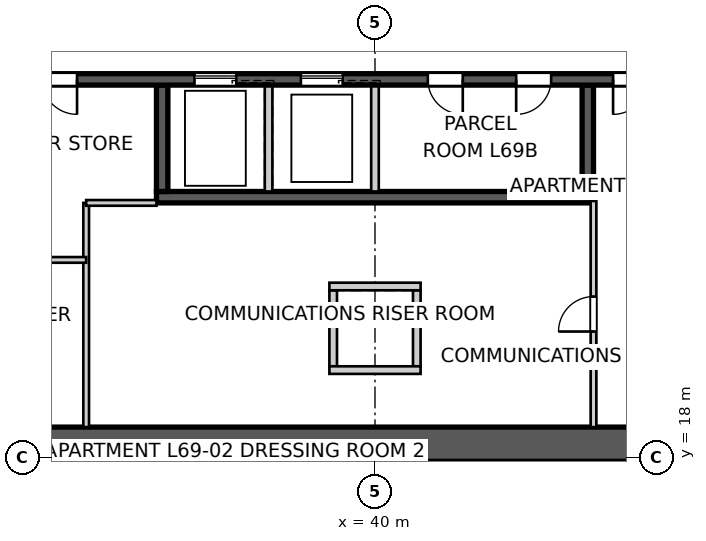
"""IFC4 building model, lengths in metres.
Left out: names, types, materials, properties, quantities, classifications, styles, units other than length and angle.
Written with IfcOpenShell. Run it as: python <this file> out.ifc"""

import sys

from ifc_helpers import new_model, si_unit, direction, frame, frame_2d, origin, place, context, subcontext, project, spatial, polyline, rectangle, outline, extrude, element, fill, save


model = new_model("IFC4")
c1 = context("Model", 3, precision=1e-05, world=origin(), true_north=direction((0.0, 1.0)))
c2 = subcontext(c1, "Body", "Model", "MODEL_VIEW")
j1 = project(units=[si_unit("LENGTHUNIT", "METRE"), si_unit("PLANEANGLEUNIT", "RADIAN")], contexts=[c1])
p1 = place(None, origin())
s1 = spatial("IfcSite", under=j1, at=p1, CompositionType="ELEMENT")
p2 = place(p1, origin())
s2 = spatial("IfcBuilding", under=s1, at=p2, CompositionType="ELEMENT")
p3 = place(p2, frame((0.0, 0.0, 250.6)))
s3 = spatial("IfcBuildingStorey", under=s2, at=p3, CompositionType="ELEMENT", Elevation=250.6)
p4 = place(p3, frame((51.2, 18.35, 0.0), z_axis=(0.0, 0.0, 1.0), x_axis=(-1.0, 0.0, 0.0)))
e1 = element("IfcWall", 1, at=p4, inside=s3, PredefinedType="SHEAR", context=c2, shape_type="SweptSolid", body=[
    extrude(outline(polyline([(0.0, -0.45), (22.4, -0.45), (22.4, -0.025), (22.85, -0.025), (22.85, 0.025), (22.4, 0.025), (22.4, 0.45), (0.0, 0.45), (0.0, 0.025), (-0.45, 0.025), (-0.45, -0.025), (0.0, -0.025), (0.0, -0.45)])), origin(), (0.0, 0.0, 1.0), 3.4),
])
p5 = place(p3, frame((51.2, 27.95, 0.0), z_axis=(0.0, 0.0, 1.0), x_axis=(-1.0, 0.0, 0.0)))
e2 = element("IfcWall", 2, at=p5, inside=s3, PredefinedType="SHEAR", context=c2, shape_type="SweptSolid", body=[
    extrude(rectangle(XDim=22.4, YDim=0.3, at=frame_2d((11.2, 0.0))), origin(), (0.0, 0.0, 1.0), 3.4),
])
p6 = place(p5, frame((19.04, 0.0, 0.0)))
e3 = element("IfcOpeningElement", 3, at=p6, cuts=e2, PredefinedType="OPENING", context=c2, shape_type="SweptSolid", body=[
    extrude(rectangle(XDim=0.92, YDim=2.1, at=frame_2d((0.46, 1.05))), frame((0.0, 0.16, 0.0), z_axis=(0.0, -1.0, 0.0), x_axis=(1.0, 0.0, 0.0)), (0.0, 0.0, 1.0), 0.32),
])
p7 = place(p5, frame((1.265, 0.0, 0.0)))
e4 = element("IfcOpeningElement", 4, at=p7, cuts=e2, PredefinedType="OPENING", context=c2, shape_type="SweptSolid", body=[
    extrude(rectangle(XDim=1.02, YDim=2.1, at=frame_2d((0.51, 1.05))), frame((0.0, 0.16, 0.0), z_axis=(0.0, -1.0, 0.0), x_axis=(1.0, 0.0, 0.0)), (0.0, 0.0, 1.0), 0.32),
])
p8 = place(p5, frame((4.015, 0.0, 0.0)))
e5 = element("IfcOpeningElement", 5, at=p8, cuts=e2, PredefinedType="OPENING", context=c2, shape_type="SweptSolid", body=[
    extrude(rectangle(XDim=0.92, YDim=2.1, at=frame_2d((0.46, 1.05))), frame((0.0, 0.16, 0.0), z_axis=(0.0, -1.0, 0.0), x_axis=(1.0, 0.0, 0.0)), (0.0, 0.0, 1.0), 0.32),
])
p9 = place(p5, frame((8.89, 0.0, 0.0)))
e6 = element("IfcOpeningElement", 6, at=p9, cuts=e2, PredefinedType="OPENING", context=c2, shape_type="SweptSolid", body=[
    extrude(rectangle(XDim=0.92, YDim=2.1, at=frame_2d((0.46, 1.05))), frame((0.0, 0.16, 0.0), z_axis=(0.0, -1.0, 0.0), x_axis=(1.0, 0.0, 0.0)), (0.0, 0.0, 1.0), 0.32),
])
p10 = place(p5, frame((6.565, 0.0, 0.0)))
e7 = element("IfcOpeningElement", 7, at=p10, cuts=e2, PredefinedType="OPENING", context=c2, shape_type="SweptSolid", body=[
    extrude(rectangle(XDim=0.92, YDim=2.1, at=frame_2d((0.46, 1.05))), frame((0.0, 0.16, 0.0), z_axis=(0.0, -1.0, 0.0), x_axis=(1.0, 0.0, 0.0)), (0.0, 0.0, 1.0), 0.32),
])
p11 = place(p5, frame((12.05, 0.0, 0.0)))
e8 = element("IfcOpeningElement", 8, at=p11, cuts=e2, PredefinedType="OPENING", context=c2, shape_type="SweptSolid", body=[
    extrude(rectangle(XDim=1.1, YDim=2.1, at=frame_2d((0.55, 1.05))), frame((0.0, 0.16, 0.0), z_axis=(0.0, -1.0, 0.0), x_axis=(1.0, 0.0, 0.0)), (0.0, 0.0, 1.0), 0.32),
])
p12 = place(p5, frame((14.85, 0.0, 0.0)))
e9 = element("IfcOpeningElement", 9, at=p12, cuts=e2, PredefinedType="OPENING", context=c2, shape_type="SweptSolid", body=[
    extrude(rectangle(XDim=1.1, YDim=2.1, at=frame_2d((0.55, 1.05))), frame((0.0, 0.16, 0.0), z_axis=(0.0, -1.0, 0.0), x_axis=(1.0, 0.0, 0.0)), (0.0, 0.0, 1.0), 0.32),
])
p13 = place(p3, frame((45.75, 24.85, 0.0), z_axis=(0.0, 0.0, 1.0), x_axis=(-1.0, 0.0, 0.0)))
e10 = element("IfcWall", 10, at=p13, inside=s3, PredefinedType="SHEAR", context=c2, shape_type="SweptSolid", body=[
    extrude(rectangle(XDim=11.5, YDim=0.3, at=frame_2d((5.75, 0.0))), origin(), (0.0, 0.0, 1.0), 3.4),
])
p14 = place(p3, frame((45.6, 27.8, 0.0), z_axis=(0.0, 0.0, 1.0), x_axis=(0.0, -1.0, 0.0)))
e11 = element("IfcWall", 11, at=p14, inside=s3, PredefinedType="SHEAR", context=c2, shape_type="SweptSolid", body=[
    extrude(rectangle(XDim=2.8, YDim=0.3, at=frame_2d((1.4, 0.0))), origin(), (0.0, 0.0, 1.0), 3.4),
])
for number, where, z_axis, x_axis in (
    (12, (40.0, 27.8, 0.0), (0.0, 0.0, 1.0), (0.0, -1.0, 0.0)),
    (13, (37.2, 27.8, 0.0), (0.0, 0.0, 1.0), (0.0, -1.0, 0.0)),
):
    element("IfcWall", number, at=place(p3, frame(where, z_axis=z_axis, x_axis=x_axis)), inside=s3, PredefinedType="SOLIDWALL", context=c2, shape_type="SweptSolid", body=[
        extrude(rectangle(XDim=2.8, YDim=0.2, at=frame_2d((1.4, 0.0))), origin(), (0.0, 0.0, 1.0), 3.4),
    ])
p15 = place(p3, frame((34.4, 27.8, 0.0), z_axis=(0.0, 0.0, 1.0), x_axis=(0.0, -1.0, 0.0)))
e14 = element("IfcWall", 14, at=p15, inside=s3, PredefinedType="SHEAR", context=c2, shape_type="SweptSolid", body=[
    extrude(rectangle(XDim=2.8, YDim=0.3, at=frame_2d((1.4, 0.0))), origin(), (0.0, 0.0, 1.0), 3.4),
])
for number, where, z_axis, x_axis in (
    (15, (38.9, 22.4, 0.0), (0.0, 0.0, 1.0), (0.0, -1.0, 0.0)),
    (16, (41.1, 22.4, 0.0), (0.0, 0.0, 1.0), (0.0, -1.0, 0.0)),
):
    element("IfcWall", number, at=place(p3, frame(where, z_axis=z_axis, x_axis=x_axis)), inside=s3, PredefinedType="SOLIDWALL", context=c2, shape_type="SweptSolid", body=[
        extrude(rectangle(XDim=2.0, YDim=0.2, at=frame_2d((1.0, 0.0))), origin(), (0.0, 0.0, 1.0), 3.4),
    ])
for number, where, z_axis, x_axis in (
    (17, (38.8, 22.5, 0.0), (0.0, 0.0, 1.0), (1.0, 0.0, 0.0)),
    (18, (38.8, 20.3, 0.0), (0.0, 0.0, 1.0), (1.0, 0.0, 0.0)),
):
    element("IfcWall", number, at=place(p3, frame(where, z_axis=z_axis, x_axis=x_axis)), inside=s3, PredefinedType="SOLIDWALL", context=c2, shape_type="SweptSolid", body=[
        extrude(rectangle(XDim=2.4, YDim=0.2, at=frame_2d((1.2, 0.0))), origin(), (0.0, 0.0, 1.0), 3.4),
    ])
p16 = place(p3, frame((45.75, 18.8, 0.0), z_axis=(0.0, 0.0, 1.0), x_axis=(0.0, 1.0, 0.0)))
e19 = element("IfcWall", 19, at=p16, inside=s3, PredefinedType="SOLIDWALL", context=c2, shape_type="SweptSolid", body=[
    extrude(rectangle(XDim=5.95, YDim=0.15, at=frame_2d((2.975, 0.0))), origin(), (0.0, 0.0, 1.0), 3.25),
])
p17 = place(p16, frame((2.515, 0.0, 0.0)))
e20 = element("IfcOpeningElement", 20, at=p17, cuts=e19, PredefinedType="OPENING", context=c2, shape_type="SweptSolid", body=[
    extrude(rectangle(XDim=0.92, YDim=2.1, at=frame_2d((0.46, 1.05))), frame((0.0, 0.085, 0.0), z_axis=(0.0, -1.0, 0.0), x_axis=(1.0, 0.0, 0.0)), (0.0, 0.0, 1.0), 0.17),
])
p18 = place(p3, frame((32.4, 18.8, 0.0), z_axis=(0.0, 0.0, 1.0), x_axis=(0.0, 1.0, 0.0)))
e21 = element("IfcWall", 21, at=p18, inside=s3, PredefinedType="SOLIDWALL", context=c2, shape_type="SweptSolid", body=[
    extrude(rectangle(XDim=5.9, YDim=0.15, at=frame_2d((2.95, 0.0))), origin(), (0.0, 0.0, 1.0), 3.25),
])
p19 = place(p3, frame((32.4, 24.7, 0.0), z_axis=(0.0, 0.0, 1.0), x_axis=(1.0, 0.0, 0.0)))
e22 = element("IfcWall", 22, at=p19, inside=s3, PredefinedType="SOLIDWALL", context=c2, shape_type="SweptSolid", body=[
    extrude(rectangle(XDim=1.85, YDim=0.15, at=frame_2d((0.925, 0.0))), origin(), (0.0, 0.0, 1.0), 3.25),
])
p20 = place(p3, frame((32.4, 23.2, 0.0), z_axis=(0.0, 0.0, 1.0), x_axis=(-1.0, 0.0, 0.0)))
e23 = element("IfcWall", 23, at=p20, inside=s3, PredefinedType="SOLIDWALL", context=c2, shape_type="SweptSolid", body=[
    extrude(rectangle(XDim=3.6, YDim=0.15, at=frame_2d((1.8, 0.0))), origin(), (0.0, 0.0, 1.0), 3.25),
])
p21 = place(p20, frame((1.34, 0.0, 0.0)))
e24 = element("IfcOpeningElement", 24, at=p21, cuts=e23, PredefinedType="OPENING", context=c2, shape_type="SweptSolid", body=[
    extrude(rectangle(XDim=0.92, YDim=2.1, at=frame_2d((0.46, 1.05))), frame((0.0, 0.085, 0.0), z_axis=(0.0, -1.0, 0.0), x_axis=(1.0, 0.0, 0.0)), (0.0, 0.0, 1.0), 0.17),
])
p22 = place(p6, origin())
e25 = element("IfcDoor", 25, at=p22, inside=s3, OperationType="SINGLE_SWING_LEFT", PredefinedType="DOOR", context=c2, shape_type="SweptSolid", body=[
    extrude(rectangle(XDim=0.92, YDim=2.1, at=frame_2d((0.46, 1.05))), frame((0.0, 0.025, 0.0), z_axis=(0.0, -1.0, 0.0), x_axis=(1.0, 0.0, 0.0)), (0.0, 0.0, 1.0), 0.05),
])
fill(e3, e25)
p23 = place(p8, origin())
e26 = element("IfcDoor", 26, at=p23, inside=s3, OperationType="SINGLE_SWING_RIGHT", PredefinedType="DOOR", context=c2, shape_type="SweptSolid", body=[
    extrude(rectangle(XDim=0.92, YDim=2.1, at=frame_2d((0.46, 1.05))), frame((0.0, 0.025, 0.0), z_axis=(0.0, -1.0, 0.0), x_axis=(1.0, 0.0, 0.0)), (0.0, 0.0, 1.0), 0.05),
])
fill(e5, e26)
p24 = place(p17, origin())
e27 = element("IfcDoor", 27, at=p24, inside=s3, OperationType="SINGLE_SWING_LEFT", PredefinedType="DOOR", context=c2, shape_type="SweptSolid", body=[
    extrude(rectangle(XDim=0.92, YDim=2.1, at=frame_2d((0.46, 1.05))), frame((0.0, 0.025, 0.0), z_axis=(0.0, -1.0, 0.0), x_axis=(1.0, 0.0, 0.0)), (0.0, 0.0, 1.0), 0.05),
])
fill(e20, e27)
p25 = place(p9, origin())
e28 = element("IfcDoor", 28, at=p25, inside=s3, OperationType="SINGLE_SWING_LEFT", PredefinedType="DOOR", context=c2, shape_type="SweptSolid", body=[
    extrude(rectangle(XDim=0.92, YDim=2.1, at=frame_2d((0.46, 1.05))), frame((0.0, 0.025, 0.0), z_axis=(0.0, -1.0, 0.0), x_axis=(1.0, 0.0, 0.0)), (0.0, 0.0, 1.0), 0.05),
])
fill(e6, e28)
p26 = place(p10, origin())
e29 = element("IfcDoor", 29, at=p26, inside=s3, OperationType="SINGLE_SWING_RIGHT", PredefinedType="DOOR", context=c2, shape_type="SweptSolid", body=[
    extrude(rectangle(XDim=0.92, YDim=2.1, at=frame_2d((0.46, 1.05))), frame((0.0, 0.025, 0.0), z_axis=(0.0, -1.0, 0.0), x_axis=(1.0, 0.0, 0.0)), (0.0, 0.0, 1.0), 0.05),
])
fill(e7, e29)
p27 = place(p11, origin())
e30 = element("IfcDoor", 30, at=p27, inside=s3, OperationType="SLIDING_TO_LEFT", PredefinedType="DOOR", context=c2, shape_type="SweptSolid", body=[
    extrude(rectangle(XDim=1.1, YDim=2.1, at=frame_2d((0.55, 1.05))), frame((0.0, 0.025, 0.0), z_axis=(0.0, -1.0, 0.0), x_axis=(1.0, 0.0, 0.0)), (0.0, 0.0, 1.0), 0.05),
])
fill(e8, e30)
p28 = place(p12, origin())
e31 = element("IfcDoor", 31, at=p28, inside=s3, OperationType="SLIDING_TO_LEFT", PredefinedType="DOOR", context=c2, shape_type="SweptSolid", body=[
    extrude(rectangle(XDim=1.1, YDim=2.1, at=frame_2d((0.55, 1.05))), frame((0.0, 0.025, 0.0), z_axis=(0.0, -1.0, 0.0), x_axis=(1.0, 0.0, 0.0)), (0.0, 0.0, 1.0), 0.05),
])
fill(e9, e31)
save(model, sys.argv[1])
